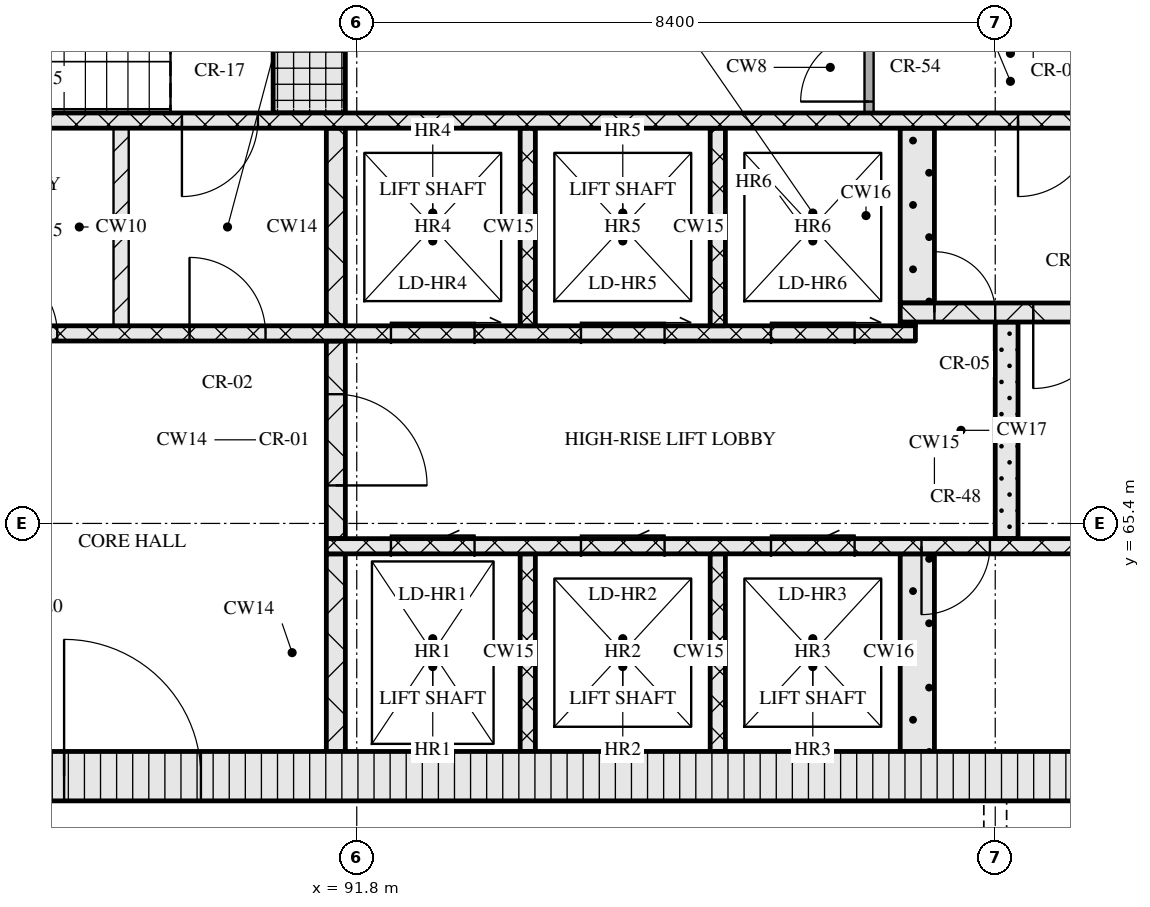
"""IFC4 building model, lengths in metres.
Left out: names, types, materials, properties, quantities, classifications, styles, units other than length and angle.
Written with IfcOpenShell. Run it as: python <this file> out.ifc"""

import sys

from ifc_helpers import new_model, si_unit, direction, frame, frame_2d, origin, place, context, subcontext, project, spatial, rectangle, extrude, element, fill, save


model = new_model("IFC4")
c1 = context("Model", 3, precision=1e-05, world=origin(), true_north=direction((0.0, 1.0)))
c2 = subcontext(c1, "Body", "Model", "MODEL_VIEW")
j1 = project(units=[si_unit("LENGTHUNIT", "METRE"), si_unit("PLANEANGLEUNIT", "RADIAN")], contexts=[c1])
p1 = place(None, origin())
s1 = spatial("IfcSite", under=j1, at=p1, CompositionType="ELEMENT")
p2 = place(p1, origin())
s2 = spatial("IfcBuilding", under=s1, at=p2, CompositionType="ELEMENT")
p3 = place(p2, frame((0.0, 0.0, 245.1)))
s3 = spatial("IfcBuildingStorey", under=s2, at=p3, CompositionType="ELEMENT", Elevation=245.1)
p4 = place(p3, frame((67.15, 62.075, 0.0), z_axis=(0.0, 0.0, 1.0), x_axis=(1.0, 0.0, 0.0)))
e1 = element("IfcWall", 1, at=p4, inside=s3, PredefinedType="SOLIDWALL", context=c2, shape_type="SweptSolid", body=[
    extrude(rectangle(XDim=40.9, YDim=0.65, at=frame_2d((20.45, 0.0))), origin(), (0.0, 0.0, 1.0), 3.32),
])
p5 = place(p4, frame((20.8, 0.0, 0.0)))
e2 = element("IfcOpeningElement", 2, at=p5, cuts=e1, PredefinedType="OPENING", context=c2, shape_type="SweptSolid", body=[
    extrude(rectangle(XDim=1.8, YDim=2.1, at=frame_2d((0.9, 1.05))), frame((0.0, 0.335, 0.0), z_axis=(0.0, -1.0, 0.0), x_axis=(1.0, 0.0, 0.0)), (0.0, 0.0, 1.0), 0.67),
])
p6 = place(p3, frame((91.525, 62.4, 0.0), z_axis=(0.0, 0.0, 1.0), x_axis=(0.0, 1.0, 0.0)))
e3 = element("IfcWall", 3, at=p6, inside=s3, PredefinedType="SOLIDWALL", context=c2, shape_type="SweptSolid", body=[
    extrude(rectangle(XDim=2.6, YDim=0.25, at=frame_2d((1.3, 0.0))), origin(), (0.0, 0.0, 1.0), 3.32),
])
for number, where, z_axis, x_axis in (
    (4, (94.05, 62.4, 0.0), (0.0, 0.0, 1.0), (0.0, 1.0, 0.0)),
    (5, (96.55, 62.4, 0.0), (0.0, 0.0, 1.0), (0.0, 1.0, 0.0)),
):
    element("IfcWall", number, at=place(p3, frame(where, z_axis=z_axis, x_axis=x_axis)), inside=s3, PredefinedType="SOLIDWALL", context=c2, shape_type="SweptSolid", body=[
        extrude(rectangle(XDim=2.6, YDim=0.2, at=frame_2d((1.3, 0.0))), origin(), (0.0, 0.0, 1.0), 3.32),
    ])
p7 = place(p3, frame((99.175, 62.4, 0.0), z_axis=(0.0, 0.0, 1.0), x_axis=(0.0, 1.0, 0.0)))
e6 = element("IfcWall", 6, at=p7, inside=s3, PredefinedType="SOLIDWALL", context=c2, shape_type="SweptSolid", body=[
    extrude(rectangle(XDim=2.6, YDim=0.45, at=frame_2d((1.3, 0.0))), origin(), (0.0, 0.0, 1.0), 3.32),
])
p8 = place(p3, frame((91.4, 65.1, 0.0), z_axis=(0.0, 0.0, 1.0), x_axis=(1.0, 0.0, 0.0)))
e7 = element("IfcWall", 7, at=p8, inside=s3, PredefinedType="SOLIDWALL", context=c2, shape_type="SweptSolid", body=[
    extrude(rectangle(XDim=16.0, YDim=0.2, at=frame_2d((8.0, 0.0))), origin(), (0.0, 0.0, 1.0), 3.32),
])
p9 = place(p8, frame((0.85, 0.0, 0.0)))
e8 = element("IfcOpeningElement", 8, at=p9, cuts=e7, PredefinedType="OPENING", context=c2, shape_type="SweptSolid", body=[
    extrude(rectangle(XDim=1.1, YDim=2.1, at=frame_2d((0.55, 1.05))), frame((0.0, 0.11, 0.0), z_axis=(0.0, -1.0, 0.0), x_axis=(1.0, 0.0, 0.0)), (0.0, 0.0, 1.0), 0.22),
])
p10 = place(p8, frame((3.35, 0.0, 0.0)))
e9 = element("IfcOpeningElement", 9, at=p10, cuts=e7, PredefinedType="OPENING", context=c2, shape_type="SweptSolid", body=[
    extrude(rectangle(XDim=1.1, YDim=2.1, at=frame_2d((0.55, 1.05))), frame((0.0, 0.11, 0.0), z_axis=(0.0, -1.0, 0.0), x_axis=(1.0, 0.0, 0.0)), (0.0, 0.0, 1.0), 0.22),
])
p11 = place(p8, frame((5.85, 0.0, 0.0)))
e10 = element("IfcOpeningElement", 10, at=p11, cuts=e7, PredefinedType="OPENING", context=c2, shape_type="SweptSolid", body=[
    extrude(rectangle(XDim=1.1, YDim=2.1, at=frame_2d((0.55, 1.05))), frame((0.0, 0.11, 0.0), z_axis=(0.0, -1.0, 0.0), x_axis=(1.0, 0.0, 0.0)), (0.0, 0.0, 1.0), 0.22),
])
p12 = place(p8, frame((7.83, 0.0, 0.0)))
e11 = element("IfcOpeningElement", 11, at=p12, cuts=e7, PredefinedType="OPENING", context=c2, shape_type="SweptSolid", body=[
    extrude(rectangle(XDim=0.9, YDim=2.1, at=frame_2d((0.45, 1.05))), frame((0.0, 0.11, 0.0), z_axis=(0.0, -1.0, 0.0), x_axis=(1.0, 0.0, 0.0)), (0.0, 0.0, 1.0), 0.22),
])
p13 = place(p3, frame((91.525, 65.2, 0.0), z_axis=(0.0, 0.0, 1.0), x_axis=(0.0, 1.0, 0.0)))
e12 = element("IfcWall", 12, at=p13, inside=s3, PredefinedType="SOLIDWALL", context=c2, shape_type="SweptSolid", body=[
    extrude(rectangle(XDim=2.6, YDim=0.25, at=frame_2d((1.3, 0.0))), origin(), (0.0, 0.0, 1.0), 3.32),
])
p14 = place(p13, frame((0.7, 0.0, 0.0)))
e13 = element("IfcOpeningElement", 13, at=p14, cuts=e12, PredefinedType="OPENING", context=c2, shape_type="SweptSolid", body=[
    extrude(rectangle(XDim=1.2, YDim=2.1, at=frame_2d((0.6, 1.05))), frame((0.0, 0.135, 0.0), z_axis=(0.0, -1.0, 0.0), x_axis=(1.0, 0.0, 0.0)), (0.0, 0.0, 1.0), 0.27),
])
p15 = place(p3, frame((100.35, 65.2, 0.0), z_axis=(0.0, 0.0, 1.0), x_axis=(0.0, 1.0, 0.0)))
e14 = element("IfcWall", 14, at=p15, inside=s3, PredefinedType="SOLIDWALL", context=c2, shape_type="SweptSolid", body=[
    extrude(rectangle(XDim=2.85, YDim=0.3, at=frame_2d((1.425, 0.0))), origin(), (0.0, 0.0, 1.0), 3.32),
])
p16 = place(p3, frame((76.05, 67.9, 0.0), z_axis=(0.0, 0.0, 1.0), x_axis=(1.0, 0.0, 0.0)))
e15 = element("IfcWall", 15, at=p16, inside=s3, PredefinedType="SOLIDWALL", context=c2, shape_type="SweptSolid", body=[
    extrude(rectangle(XDim=23.1, YDim=0.2, at=frame_2d((11.55, 0.0))), origin(), (0.0, 0.0, 1.0), 3.32),
])
p17 = place(p16, frame((0.75, 0.0, 0.0)))
e16 = element("IfcOpeningElement", 16, at=p17, cuts=e15, PredefinedType="OPENING", context=c2, shape_type="SweptSolid", body=[
    extrude(rectangle(XDim=0.9, YDim=2.1, at=frame_2d((0.45, 1.05))), frame((0.0, 0.11, 0.0), z_axis=(0.0, -1.0, 0.0), x_axis=(1.0, 0.0, 0.0)), (0.0, 0.0, 1.0), 0.22),
])
p18 = place(p16, frame((3.32, 0.0, 0.0)))
e17 = element("IfcOpeningElement", 17, at=p18, cuts=e15, PredefinedType="OPENING", context=c2, shape_type="SweptSolid", body=[
    extrude(rectangle(XDim=0.9, YDim=2.1, at=frame_2d((0.45, 1.05))), frame((0.0, 0.11, 0.0), z_axis=(0.0, -1.0, 0.0), x_axis=(1.0, 0.0, 0.0)), (0.0, 0.0, 1.0), 0.22),
])
p19 = place(p16, frame((5.77, 0.0, 0.0)))
e18 = element("IfcOpeningElement", 18, at=p19, cuts=e15, PredefinedType="OPENING", context=c2, shape_type="SweptSolid", body=[
    extrude(rectangle(XDim=0.9, YDim=2.1, at=frame_2d((0.45, 1.05))), frame((0.0, 0.11, 0.0), z_axis=(0.0, -1.0, 0.0), x_axis=(1.0, 0.0, 0.0)), (0.0, 0.0, 1.0), 0.22),
])
p20 = place(p16, frame((8.45, 0.0, 0.0)))
e19 = element("IfcOpeningElement", 19, at=p20, cuts=e15, PredefinedType="OPENING", context=c2, shape_type="SweptSolid", body=[
    extrude(rectangle(XDim=0.9, YDim=2.1, at=frame_2d((0.45, 1.05))), frame((0.0, 0.11, 0.0), z_axis=(0.0, -1.0, 0.0), x_axis=(1.0, 0.0, 0.0)), (0.0, 0.0, 1.0), 0.22),
])
p21 = place(p16, frame((10.91, 0.0, 0.0)))
e20 = element("IfcOpeningElement", 20, at=p21, cuts=e15, PredefinedType="OPENING", context=c2, shape_type="SweptSolid", body=[
    extrude(rectangle(XDim=0.9, YDim=2.1, at=frame_2d((0.45, 1.05))), frame((0.0, 0.11, 0.0), z_axis=(0.0, -1.0, 0.0), x_axis=(1.0, 0.0, 0.0)), (0.0, 0.0, 1.0), 0.22),
])
p22 = place(p16, frame((13.55, 0.0, 0.0)))
e21 = element("IfcOpeningElement", 21, at=p22, cuts=e15, PredefinedType="OPENING", context=c2, shape_type="SweptSolid", body=[
    extrude(rectangle(XDim=1.0, YDim=2.1, at=frame_2d((0.5, 1.05))), frame((0.0, 0.11, 0.0), z_axis=(0.0, -1.0, 0.0), x_axis=(1.0, 0.0, 0.0)), (0.0, 0.0, 1.0), 0.22),
])
p23 = place(p16, frame((16.2, 0.0, 0.0)))
e22 = element("IfcOpeningElement", 22, at=p23, cuts=e15, PredefinedType="OPENING", context=c2, shape_type="SweptSolid", body=[
    extrude(rectangle(XDim=1.1, YDim=2.1, at=frame_2d((0.55, 1.05))), frame((0.0, 0.11, 0.0), z_axis=(0.0, -1.0, 0.0), x_axis=(1.0, 0.0, 0.0)), (0.0, 0.0, 1.0), 0.22),
])
p24 = place(p16, frame((18.7, 0.0, 0.0)))
e23 = element("IfcOpeningElement", 23, at=p24, cuts=e15, PredefinedType="OPENING", context=c2, shape_type="SweptSolid", body=[
    extrude(rectangle(XDim=1.1, YDim=2.1, at=frame_2d((0.55, 1.05))), frame((0.0, 0.11, 0.0), z_axis=(0.0, -1.0, 0.0), x_axis=(1.0, 0.0, 0.0)), (0.0, 0.0, 1.0), 0.22),
])
p25 = place(p16, frame((21.2, 0.0, 0.0)))
e24 = element("IfcOpeningElement", 24, at=p25, cuts=e15, PredefinedType="OPENING", context=c2, shape_type="SweptSolid", body=[
    extrude(rectangle(XDim=1.1, YDim=2.1, at=frame_2d((0.55, 1.05))), frame((0.0, 0.11, 0.0), z_axis=(0.0, -1.0, 0.0), x_axis=(1.0, 0.0, 0.0)), (0.0, 0.0, 1.0), 0.22),
])
p26 = place(p3, frame((88.7, 68.0, 0.0), z_axis=(0.0, 0.0, 1.0), x_axis=(0.0, 1.0, 0.0)))
e25 = element("IfcWall", 25, at=p26, inside=s3, PredefinedType="PARTITIONING", context=c2, shape_type="SweptSolid", body=[
    extrude(rectangle(XDim=2.6, YDim=0.2, at=frame_2d((1.3, 0.0))), origin(), (0.0, 0.0, 1.0), 3.32),
])
p27 = place(p3, frame((91.525, 68.0, 0.0), z_axis=(0.0, 0.0, 1.0), x_axis=(0.0, 1.0, 0.0)))
e26 = element("IfcWall", 26, at=p27, inside=s3, PredefinedType="SOLIDWALL", context=c2, shape_type="SweptSolid", body=[
    extrude(rectangle(XDim=2.6, YDim=0.25, at=frame_2d((1.3, 0.0))), origin(), (0.0, 0.0, 1.0), 3.32),
])
for number, where, z_axis, x_axis in (
    (27, (94.05, 68.0, 0.0), (0.0, 0.0, 1.0), (0.0, 1.0, 0.0)),
    (28, (96.55, 68.0, 0.0), (0.0, 0.0, 1.0), (0.0, 1.0, 0.0)),
):
    element("IfcWall", number, at=place(p3, frame(where, z_axis=z_axis, x_axis=x_axis)), inside=s3, PredefinedType="SOLIDWALL", context=c2, shape_type="SweptSolid", body=[
        extrude(rectangle(XDim=2.6, YDim=0.2, at=frame_2d((1.3, 0.0))), origin(), (0.0, 0.0, 1.0), 3.32),
    ])
p28 = place(p3, frame((98.95, 68.025, 0.0), z_axis=(0.0, 0.0, 1.0), x_axis=(1.0, 0.0, 0.0)))
e29 = element("IfcWall", 29, at=p28, inside=s3, PredefinedType="SOLIDWALL", context=c2, shape_type="SweptSolid", body=[
    extrude(rectangle(XDim=0.2, YDim=0.05, at=frame_2d((0.1, 0.0))), origin(), (0.0, 0.0, 1.0), 3.32),
])
p29 = place(p3, frame((98.95, 68.175, 0.0), z_axis=(0.0, 0.0, 1.0), x_axis=(1.0, 0.0, 0.0)))
e30 = element("IfcWall", 30, at=p29, inside=s3, PredefinedType="SOLIDWALL", context=c2, shape_type="SweptSolid", body=[
    extrude(rectangle(XDim=8.45, YDim=0.25, at=frame_2d((4.225, 0.0))), origin(), (0.0, 0.0, 1.0), 3.32),
])
p30 = place(p29, frame((0.45, 0.0, 0.0)))
e31 = element("IfcOpeningElement", 31, at=p30, cuts=e30, PredefinedType="OPENING", context=c2, shape_type="SweptSolid", body=[
    extrude(rectangle(XDim=0.8, YDim=2.1, at=frame_2d((0.4, 1.05))), frame((0.0, 0.135, 0.0), z_axis=(0.0, -1.0, 0.0), x_axis=(1.0, 0.0, 0.0)), (0.0, 0.0, 1.0), 0.27),
])
p31 = place(p29, frame((1.75, 0.0, 0.0)))
e32 = element("IfcOpeningElement", 32, at=p31, cuts=e30, PredefinedType="OPENING", context=c2, shape_type="SweptSolid", body=[
    extrude(rectangle(XDim=1.0, YDim=2.1, at=frame_2d((0.5, 1.05))), frame((0.0, 0.135, 0.0), z_axis=(0.0, -1.0, 0.0), x_axis=(1.0, 0.0, 0.0)), (0.0, 0.0, 1.0), 0.27),
])
p32 = place(p3, frame((99.175, 68.3, 0.0), z_axis=(0.0, 0.0, 1.0), x_axis=(0.0, 1.0, 0.0)))
e33 = element("IfcWall", 33, at=p32, inside=s3, PredefinedType="SOLIDWALL", context=c2, shape_type="SweptSolid", body=[
    extrude(rectangle(XDim=2.3, YDim=0.45, at=frame_2d((1.15, 0.0))), origin(), (0.0, 0.0, 1.0), 3.32),
])
p33 = place(p3, frame((67.8, 70.7, 0.0), z_axis=(0.0, 0.0, 1.0), x_axis=(1.0, 0.0, 0.0)))
e34 = element("IfcWall", 34, at=p33, inside=s3, PredefinedType="SOLIDWALL", context=c2, shape_type="SweptSolid", body=[
    extrude(rectangle(XDim=39.6, YDim=0.2, at=frame_2d((19.8, 0.0))), origin(), (0.0, 0.0, 1.0), 3.32),
])
p34 = place(p33, frame((0.65, 0.0, 0.0)))
e35 = element("IfcOpeningElement", 35, at=p34, cuts=e34, PredefinedType="OPENING", context=c2, shape_type="SweptSolid", body=[
    extrude(rectangle(XDim=1.1, YDim=2.1, at=frame_2d((0.55, 1.05))), frame((0.0, 0.11, 0.0), z_axis=(0.0, -1.0, 0.0), x_axis=(1.0, 0.0, 0.0)), (0.0, 0.0, 1.0), 0.22),
])
p35 = place(p33, frame((3.25, 0.0, 0.0)))
e36 = element("IfcOpeningElement", 36, at=p35, cuts=e34, PredefinedType="OPENING", context=c2, shape_type="SweptSolid", body=[
    extrude(rectangle(XDim=1.1, YDim=2.1, at=frame_2d((0.55, 1.05))), frame((0.0, 0.11, 0.0), z_axis=(0.0, -1.0, 0.0), x_axis=(1.0, 0.0, 0.0)), (0.0, 0.0, 1.0), 0.22),
])
p36 = place(p33, frame((5.9, 0.0, 0.0)))
e37 = element("IfcOpeningElement", 37, at=p36, cuts=e34, PredefinedType="OPENING", context=c2, shape_type="SweptSolid", body=[
    extrude(rectangle(XDim=1.0, YDim=2.1, at=frame_2d((0.5, 1.05))), frame((0.0, 0.11, 0.0), z_axis=(0.0, -1.0, 0.0), x_axis=(1.0, 0.0, 0.0)), (0.0, 0.0, 1.0), 0.22),
])
p37 = place(p33, frame((21.7, 0.0, 0.0)))
e38 = element("IfcOpeningElement", 38, at=p37, cuts=e34, PredefinedType="OPENING", context=c2, shape_type="SweptSolid", body=[
    extrude(rectangle(XDim=1.0, YDim=2.1, at=frame_2d((0.5, 1.05))), frame((0.0, 0.11, 0.0), z_axis=(0.0, -1.0, 0.0), x_axis=(1.0, 0.0, 0.0)), (0.0, 0.0, 1.0), 0.22),
])
p38 = place(p33, frame((32.7, 0.0, 0.0)))
e39 = element("IfcOpeningElement", 39, at=p38, cuts=e34, PredefinedType="OPENING", context=c2, shape_type="SweptSolid", body=[
    extrude(rectangle(XDim=1.0, YDim=2.1, at=frame_2d((0.5, 1.05))), frame((0.0, 0.11, 0.0), z_axis=(0.0, -1.0, 0.0), x_axis=(1.0, 0.0, 0.0)), (0.0, 0.0, 1.0), 0.22),
])
p39 = place(p33, frame((35.25, 0.0, 0.0)))
e40 = element("IfcOpeningElement", 40, at=p39, cuts=e34, PredefinedType="OPENING", context=c2, shape_type="SweptSolid", body=[
    extrude(rectangle(XDim=1.1, YDim=2.1, at=frame_2d((0.55, 1.05))), frame((0.0, 0.11, 0.0), z_axis=(0.0, -1.0, 0.0), x_axis=(1.0, 0.0, 0.0)), (0.0, 0.0, 1.0), 0.22),
])
p40 = place(p33, frame((37.85, 0.0, 0.0)))
e41 = element("IfcOpeningElement", 41, at=p40, cuts=e34, PredefinedType="OPENING", context=c2, shape_type="SweptSolid", body=[
    extrude(rectangle(XDim=1.1, YDim=2.1, at=frame_2d((0.55, 1.05))), frame((0.0, 0.11, 0.0), z_axis=(0.0, -1.0, 0.0), x_axis=(1.0, 0.0, 0.0)), (0.0, 0.0, 1.0), 0.22),
])
p41 = place(p3, frame((91.175, 70.8, 0.0), z_axis=(0.0, 0.0, 1.0), x_axis=(0.0, 1.0, 0.0)))
e42 = element("IfcWall", 42, at=p41, inside=s3, PredefinedType="SOLIDWALL", context=c2, shape_type="SweptSolid", body=[
    extrude(rectangle(XDim=2.95, YDim=0.95, at=frame_2d((1.475, 0.0))), origin(), (0.0, 0.0, 1.0), 3.32),
])
p42 = place(p3, frame((98.54, 70.8, 0.0), z_axis=(0.0, 0.0, 1.0), x_axis=(0.0, 1.0, 0.0)))
e43 = element("IfcWall", 43, at=p42, inside=s3, PredefinedType="PARTITIONING", context=c2, shape_type="SweptSolid", body=[
    extrude(rectangle(XDim=1.2, YDim=0.12, at=frame_2d((0.6, 0.0))), origin(), (0.0, 0.0, 1.0), 3.32),
])
p43 = place(p42, frame((0.15, 0.0, 0.0)))
e44 = element("IfcOpeningElement", 44, at=p43, cuts=e43, PredefinedType="OPENING", context=c2, shape_type="SweptSolid", body=[
    extrude(rectangle(XDim=0.9, YDim=2.1, at=frame_2d((0.45, 1.05))), frame((0.0, 0.07, 0.0), z_axis=(0.0, -1.0, 0.0), x_axis=(1.0, 0.0, 0.0)), (0.0, 0.0, 1.0), 0.14),
])
p44 = place(p5, origin())
e45 = element("IfcDoor", 45, at=p44, inside=s3, OperationType="DOUBLE_DOOR_SINGLE_SWING", PredefinedType="DOOR", context=c2, shape_type="SweptSolid", body=[
    extrude(rectangle(XDim=1.8, YDim=2.1, at=frame_2d((0.9, 1.05))), frame((0.0, 0.025, 0.0), z_axis=(0.0, -1.0, 0.0), x_axis=(1.0, 0.0, 0.0)), (0.0, 0.0, 1.0), 0.05),
])
fill(e2, e45)
p45 = place(p9, origin())
e46 = element("IfcDoor", 46, at=p45, inside=s3, OperationType="SLIDING_TO_LEFT", PredefinedType="DOOR", context=c2, shape_type="SweptSolid", body=[
    extrude(rectangle(XDim=1.1, YDim=2.1, at=frame_2d((0.55, 1.05))), frame((0.0, 0.025, 0.0), z_axis=(0.0, -1.0, 0.0), x_axis=(1.0, 0.0, 0.0)), (0.0, 0.0, 1.0), 0.05),
])
fill(e8, e46)
p46 = place(p10, origin())
e47 = element("IfcDoor", 47, at=p46, inside=s3, OperationType="SLIDING_TO_LEFT", PredefinedType="DOOR", context=c2, shape_type="SweptSolid", body=[
    extrude(rectangle(XDim=1.1, YDim=2.1, at=frame_2d((0.55, 1.05))), frame((0.0, 0.025, 0.0), z_axis=(0.0, -1.0, 0.0), x_axis=(1.0, 0.0, 0.0)), (0.0, 0.0, 1.0), 0.05),
])
fill(e9, e47)
p47 = place(p11, origin())
e48 = element("IfcDoor", 48, at=p47, inside=s3, OperationType="SLIDING_TO_LEFT", PredefinedType="DOOR", context=c2, shape_type="SweptSolid", body=[
    extrude(rectangle(XDim=1.1, YDim=2.1, at=frame_2d((0.55, 1.05))), frame((0.0, 0.025, 0.0), z_axis=(0.0, -1.0, 0.0), x_axis=(1.0, 0.0, 0.0)), (0.0, 0.0, 1.0), 0.05),
])
fill(e10, e48)
p48 = place(p12, origin())
e49 = element("IfcDoor", 49, at=p48, inside=s3, OperationType="SINGLE_SWING_RIGHT", PredefinedType="DOOR", context=c2, shape_type="SweptSolid", body=[
    extrude(rectangle(XDim=0.9, YDim=2.1, at=frame_2d((0.45, 1.05))), frame((0.0, 0.025, 0.0), z_axis=(0.0, -1.0, 0.0), x_axis=(1.0, 0.0, 0.0)), (0.0, 0.0, 1.0), 0.05),
])
fill(e11, e49)
p49 = place(p14, origin())
e50 = element("IfcDoor", 50, at=p49, inside=s3, OperationType="SINGLE_SWING_RIGHT", PredefinedType="DOOR", context=c2, shape_type="SweptSolid", body=[
    extrude(rectangle(XDim=1.2, YDim=2.1, at=frame_2d((0.6, 1.05))), frame((0.0, 0.025, 0.0), z_axis=(0.0, -1.0, 0.0), x_axis=(1.0, 0.0, 0.0)), (0.0, 0.0, 1.0), 0.05),
])
fill(e13, e50)
p50 = place(p21, origin())
e51 = element("IfcDoor", 51, at=p50, inside=s3, OperationType="SINGLE_SWING_LEFT", PredefinedType="DOOR", context=c2, shape_type="SweptSolid", body=[
    extrude(rectangle(XDim=0.9, YDim=2.1, at=frame_2d((0.45, 1.05))), frame((0.0, 0.025, 0.0), z_axis=(0.0, -1.0, 0.0), x_axis=(1.0, 0.0, 0.0)), (0.0, 0.0, 1.0), 0.05),
])
fill(e20, e51)
p51 = place(p22, origin())
e52 = element("IfcDoor", 52, at=p51, inside=s3, OperationType="SINGLE_SWING_LEFT", PredefinedType="DOOR", context=c2, shape_type="SweptSolid", body=[
    extrude(rectangle(XDim=1.0, YDim=2.1, at=frame_2d((0.5, 1.05))), frame((0.0, 0.025, 0.0), z_axis=(0.0, -1.0, 0.0), x_axis=(1.0, 0.0, 0.0)), (0.0, 0.0, 1.0), 0.05),
])
fill(e21, e52)
p52 = place(p23, origin())
e53 = element("IfcDoor", 53, at=p52, inside=s3, OperationType="SLIDING_TO_RIGHT", PredefinedType="DOOR", context=c2, shape_type="SweptSolid", body=[
    extrude(rectangle(XDim=1.1, YDim=2.1, at=frame_2d((0.55, 1.05))), frame((0.0, 0.025, 0.0), z_axis=(0.0, -1.0, 0.0), x_axis=(1.0, 0.0, 0.0)), (0.0, 0.0, 1.0), 0.05),
])
fill(e22, e53)
p53 = place(p24, origin())
e54 = element("IfcDoor", 54, at=p53, inside=s3, OperationType="SLIDING_TO_RIGHT", PredefinedType="DOOR", context=c2, shape_type="SweptSolid", body=[
    extrude(rectangle(XDim=1.1, YDim=2.1, at=frame_2d((0.55, 1.05))), frame((0.0, 0.025, 0.0), z_axis=(0.0, -1.0, 0.0), x_axis=(1.0, 0.0, 0.0)), (0.0, 0.0, 1.0), 0.05),
])
fill(e23, e54)
p54 = place(p25, origin())
e55 = element("IfcDoor", 55, at=p54, inside=s3, OperationType="SLIDING_TO_RIGHT", PredefinedType="DOOR", context=c2, shape_type="SweptSolid", body=[
    extrude(rectangle(XDim=1.1, YDim=2.1, at=frame_2d((0.55, 1.05))), frame((0.0, 0.025, 0.0), z_axis=(0.0, -1.0, 0.0), x_axis=(1.0, 0.0, 0.0)), (0.0, 0.0, 1.0), 0.05),
])
fill(e24, e55)
p55 = place(p30, origin())
e56 = element("IfcDoor", 56, at=p55, inside=s3, OperationType="SINGLE_SWING_LEFT", PredefinedType="DOOR", context=c2, shape_type="SweptSolid", body=[
    extrude(rectangle(XDim=0.8, YDim=2.1, at=frame_2d((0.4, 1.05))), frame((0.0, 0.025, 0.0), z_axis=(0.0, -1.0, 0.0), x_axis=(1.0, 0.0, 0.0)), (0.0, 0.0, 1.0), 0.05),
])
fill(e31, e56)
p56 = place(p31, origin())
e57 = element("IfcDoor", 57, at=p56, inside=s3, OperationType="SINGLE_SWING_RIGHT", PredefinedType="DOOR", context=c2, shape_type="SweptSolid", body=[
    extrude(rectangle(XDim=1.0, YDim=2.1, at=frame_2d((0.5, 1.05))), frame((0.0, 0.025, 0.0), z_axis=(0.0, -1.0, 0.0), x_axis=(1.0, 0.0, 0.0)), (0.0, 0.0, 1.0), 0.05),
])
fill(e32, e57)
p57 = place(p37, origin())
e58 = element("IfcDoor", 58, at=p57, inside=s3, OperationType="SINGLE_SWING_RIGHT", PredefinedType="DOOR", context=c2, shape_type="SweptSolid", body=[
    extrude(rectangle(XDim=1.0, YDim=2.1, at=frame_2d((0.5, 1.05))), frame((0.0, 0.025, 0.0), z_axis=(0.0, -1.0, 0.0), x_axis=(1.0, 0.0, 0.0)), (0.0, 0.0, 1.0), 0.05),
])
fill(e38, e58)
p58 = place(p38, origin())
e59 = element("IfcDoor", 59, at=p58, inside=s3, OperationType="SINGLE_SWING_RIGHT", PredefinedType="DOOR", context=c2, shape_type="SweptSolid", body=[
    extrude(rectangle(XDim=1.0, YDim=2.1, at=frame_2d((0.5, 1.05))), frame((0.0, 0.025, 0.0), z_axis=(0.0, -1.0, 0.0), x_axis=(1.0, 0.0, 0.0)), (0.0, 0.0, 1.0), 0.05),
])
fill(e39, e59)
p59 = place(p43, origin())
e60 = element("IfcDoor", 60, at=p59, inside=s3, OperationType="SINGLE_SWING_LEFT", PredefinedType="DOOR", context=c2, shape_type="SweptSolid", body=[
    extrude(rectangle(XDim=0.9, YDim=2.1, at=frame_2d((0.45, 1.05))), frame((0.0, 0.025, 0.0), z_axis=(0.0, -1.0, 0.0), x_axis=(1.0, 0.0, 0.0)), (0.0, 0.0, 1.0), 0.05),
])
fill(e44, e60)
save(model, sys.argv[1])
